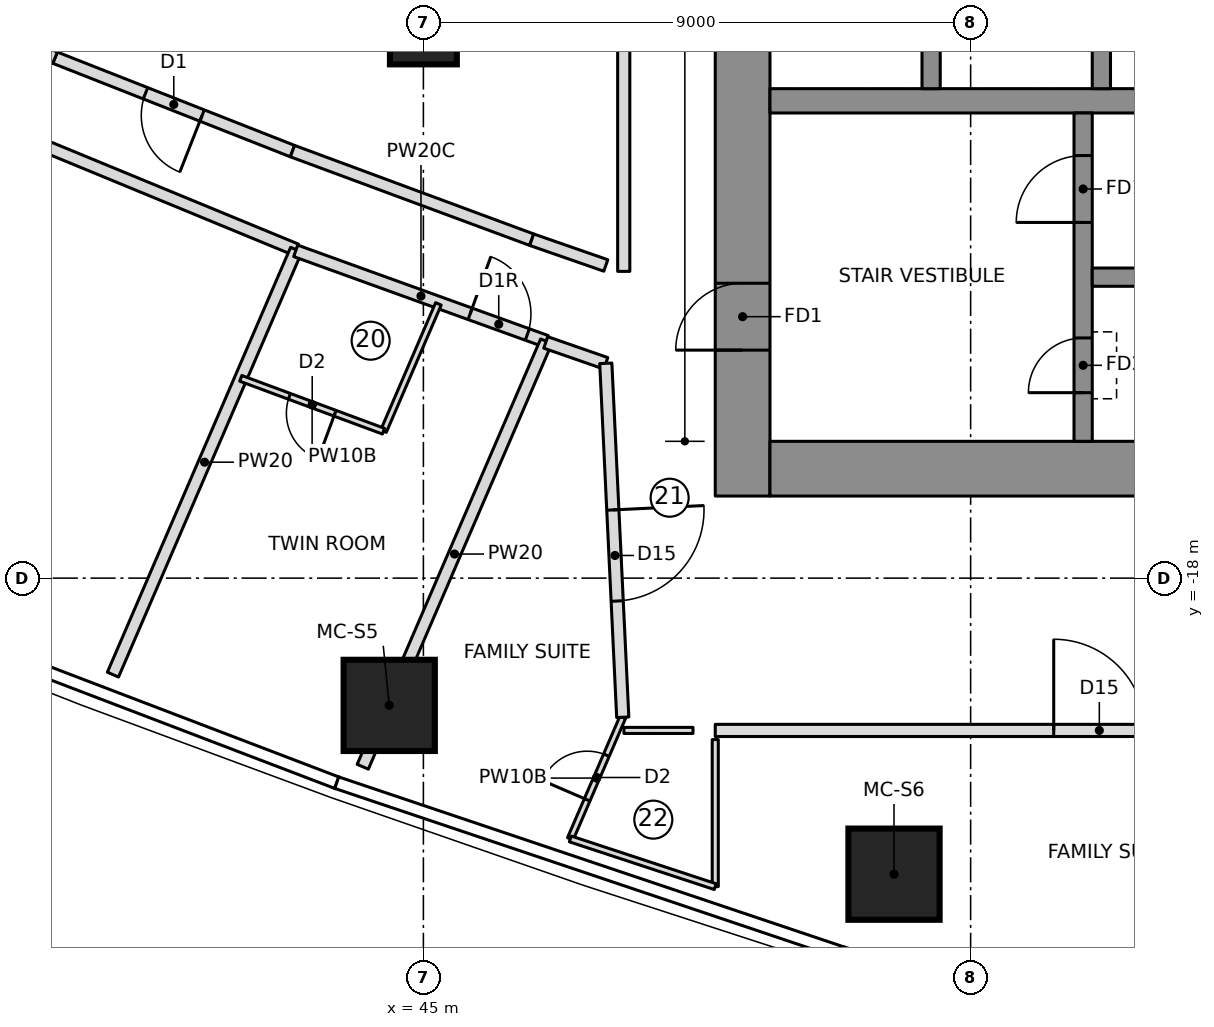
"""IFC4 building model, lengths in metres.
Left out: names, types, materials, properties, quantities, classifications, styles, units other than length and angle.
Written with IfcOpenShell. Run it as: python <this file> out.ifc"""

import sys

from ifc_helpers import new_model, si_unit, direction, frame, frame_2d, origin, origin_2d, place, context, subcontext, project, spatial, polyline, rectangle, outline, extrude, element, fill, save


model = new_model("IFC4")
c1 = context("Model", 3, precision=1e-05, world=origin(), true_north=direction((0.0, 1.0)))
c2 = subcontext(c1, "Body", "Model", "MODEL_VIEW")
j1 = project(units=[si_unit("LENGTHUNIT", "METRE"), si_unit("PLANEANGLEUNIT", "RADIAN")], contexts=[c1])
p1 = place(None, origin())
s1 = spatial("IfcSite", under=j1, at=p1, CompositionType="ELEMENT")
p2 = place(p1, origin())
s2 = spatial("IfcBuilding", under=s1, at=p2, CompositionType="ELEMENT")
p3 = place(p2, frame((0.0, 0.0, 133.75)))
s3 = spatial("IfcBuildingStorey", under=s2, at=p3, CompositionType="ELEMENT", Elevation=133.75)
p4 = place(p3, frame((50.25, -16.65, 0.0), z_axis=(0.0, 0.0, 1.0), x_axis=(0.0, 1.0, 0.0)))
e1 = element("IfcWall", 1, at=p4, inside=s3, PredefinedType="SHEAR", context=c2, shape_type="SweptSolid", body=[
    extrude(rectangle(XDim=10.0, YDim=0.9, at=frame_2d((5.0, 0.0))), origin(), (0.0, 0.0, 1.0), 3.55),
])
p5 = place(p4, frame((2.4, 0.0, 0.0)))
e2 = element("IfcOpeningElement", 2, at=p5, cuts=e1, PredefinedType="OPENING", context=c2, shape_type="SweptSolid", body=[
    extrude(rectangle(XDim=1.1, YDim=2.1, at=frame_2d((0.55, 1.05))), frame((0.0, 0.46, 0.0), z_axis=(0.0, -1.0, 0.0), x_axis=(1.0, 0.0, 0.0)), (0.0, 0.0, 1.0), 0.92),
])
p6 = place(p3, frame((50.7, -16.2, 0.0), z_axis=(0.0, 0.0, 1.0), x_axis=(1.0, 0.0, 0.0)))
e3 = element("IfcWall", 3, at=p6, inside=s3, PredefinedType="SHEAR", context=c2, shape_type="SweptSolid", body=[
    extrude(rectangle(XDim=13.92, YDim=0.9, at=frame_2d((6.96, 0.0))), origin(), (0.0, 0.0, 1.0), 3.55),
])
p7 = place(p3, frame((50.7, -10.15, 0.0), z_axis=(0.0, 0.0, 1.0), x_axis=(1.0, 0.0, 0.0)))
e4 = element("IfcWall", 4, at=p7, inside=s3, PredefinedType="SHEAR", context=c2, shape_type="SweptSolid", body=[
    extrude(rectangle(XDim=13.02, YDim=0.4, at=frame_2d((6.51, 0.0))), origin(), (0.0, 0.0, 1.0), 3.55),
])
for number, where, z_axis, x_axis in (
    (5, (53.35, -9.95, 0.0), (0.0, 0.0, 1.0), (0.0, 1.0, 0.0)),
    (6, (56.15, -9.95, 0.0), (0.0, 0.0, 1.0), (0.0, 1.0, 0.0)),
):
    element("IfcWall", number, at=place(p3, frame(where, z_axis=z_axis, x_axis=x_axis)), inside=s3, PredefinedType="SHEAR", context=c2, shape_type="SweptSolid", body=[
        extrude(rectangle(XDim=3.0, YDim=0.3, at=frame_2d((1.5, 0.0))), origin(), (0.0, 0.0, 1.0), 3.55),
    ])
p8 = place(p3, frame((55.85, -15.75, 0.0), z_axis=(0.0, 0.0, 1.0), x_axis=(0.0, 1.0, 0.0)))
e7 = element("IfcWall", 7, at=p8, inside=s3, PredefinedType="SHEAR", context=c2, shape_type="SweptSolid", body=[
    extrude(rectangle(XDim=5.4, YDim=0.3, at=frame_2d((2.7, 0.0))), origin(), (0.0, 0.0, 1.0), 3.55),
])
p9 = place(p8, frame((3.6, 0.0, 0.0)))
e8 = element("IfcOpeningElement", 8, at=p9, cuts=e7, PredefinedType="OPENING", context=c2, shape_type="SweptSolid", body=[
    extrude(rectangle(XDim=1.1, YDim=2.1, at=frame_2d((0.55, 1.05))), frame((0.0, 0.16, 0.0), z_axis=(0.0, -1.0, 0.0), x_axis=(1.0, 0.0, 0.0)), (0.0, 0.0, 1.0), 0.32),
])
p10 = place(p8, frame((0.8, 0.0, 0.0)))
e9 = element("IfcOpeningElement", 9, at=p10, cuts=e7, PredefinedType="OPENING", context=c2, shape_type="SweptSolid", body=[
    extrude(rectangle(XDim=0.9, YDim=2.1, at=frame_2d((0.45, 1.05))), frame((0.0, 0.16, 0.0), z_axis=(0.0, -1.0, 0.0), x_axis=(1.0, 0.0, 0.0)), (0.0, 0.0, 1.0), 0.32),
])
p11 = place(p3, frame((56.0, -13.05, 0.0), z_axis=(0.0, 0.0, 1.0), x_axis=(1.0, 0.0, 0.0)))
e10 = element("IfcWall", 10, at=p11, inside=s3, PredefinedType="SHEAR", context=c2, shape_type="SweptSolid", body=[
    extrude(rectangle(XDim=7.72, YDim=0.3, at=frame_2d((3.86, 0.0))), origin(), (0.0, 0.0, 1.0), 3.55),
])
for number, where, z_axis, x_axis in (
    (11, (44.438, -20.093, 0.0), (0.0, 0.0, 1.0), (1.0, 0.0, 0.0)),
    (12, (52.74, -22.869, 0.0), (0.0, 0.0, 1.0), (1.0, 0.0, 0.0)),
):
    element("IfcColumn", number, at=place(p3, frame(where, z_axis=z_axis, x_axis=x_axis)), inside=s3, PredefinedType="COLUMN", context=c2, shape_type="SweptSolid", body=[
        extrude(rectangle(XDim=1.5, YDim=1.5, at=origin_2d()), origin(), (0.0, 0.0, 1.0), 3.55),
    ])
p12 = place(p3, frame((45.0, -9.0, 0.0), z_axis=(0.0, 0.0, 1.0), x_axis=(1.0, 0.0, 0.0)))
e13 = element("IfcColumn", 13, at=p12, inside=s3, PredefinedType="COLUMN", context=c2, shape_type="SweptSolid", body=[
    extrude(rectangle(XDim=1.1, YDim=1.1, at=origin_2d()), origin(), (0.0, 0.0, 1.0), 3.55),
])
p13 = place(p3, frame((51.859, -24.257, 0.0), z_axis=(0.0, 0.0, 1.0), x_axis=(0.956964488344, -0.290205044837, 0.0)))
e14 = element("IfcWall", 14, at=p13, inside=s3, PredefinedType="NOTDEFINED", context=c2, shape_type="SweptSolid", body=[
    extrude(outline(polyline([(0.0, -0.2), (4.418, -0.2), (4.357, 0.2), (0.0, 0.2), (0.0, -0.2)])), origin(), (0.0, 0.0, 1.0), 3.25),
])
p14 = place(p13, frame((0.294, 0.0, 0.9)))
e15 = element("IfcOpeningElement", 15, at=p14, cuts=e14, PredefinedType="OPENING", context=c2, shape_type="SweptSolid", body=[
    extrude(rectangle(XDim=3.8, YDim=1.8, at=frame_2d((1.9, 0.9))), frame((0.0, 0.21, 0.0), z_axis=(0.0, -1.0, 0.0), x_axis=(1.0, 0.0, 0.0)), (0.0, 0.0, 1.0), 0.42),
])
p15 = place(p3, frame((30.772, -7.594, 0.0), z_axis=(0.0, 0.0, 1.0), x_axis=(0.924461873383, -0.381274500407, 0.0)))
e16 = element("IfcWall", 16, at=p15, inside=s3, PredefinedType="PARTITIONING", context=c2, shape_type="SweptSolid", body=[
    extrude(rectangle(XDim=13.127, YDim=0.2, at=frame_2d((6.564, 0.0))), origin(), (0.0, 0.0, 1.0), 3.25),
])
p16 = place(p15, frame((4.25, 0.0, 0.0)))
e17 = element("IfcOpeningElement", 17, at=p16, cuts=e16, PredefinedType="OPENING", context=c2, shape_type="SweptSolid", body=[
    extrude(rectangle(XDim=1.5, YDim=2.1, at=frame_2d((0.75, 1.05))), frame((0.0, 0.11, 0.0), z_axis=(0.0, -1.0, 0.0), x_axis=(1.0, 0.0, 0.0)), (0.0, 0.0, 1.0), 0.22),
])
p17 = place(p3, frame((39.895, -19.587, 0.0), z_axis=(0.0, 0.0, 1.0), x_axis=(0.395993528256, 0.918253301426, 0.0)))
e18 = element("IfcWall", 18, at=p17, inside=s3, PredefinedType="PARTITIONING", context=c2, shape_type="SweptSolid", body=[
    extrude(rectangle(XDim=7.61, YDim=0.2, at=frame_2d((3.805, 0.0))), origin(), (0.0, 0.0, 1.0), 3.25),
])
p18 = place(p3, frame((42.9, -12.617, 0.0), z_axis=(0.0, 0.0, 1.0), x_axis=(0.940555877924, -0.339638985546, 0.0)))
e19 = element("IfcWall", 19, at=p18, inside=s3, PredefinedType="PARTITIONING", context=c2, shape_type="SweptSolid", body=[
    extrude(rectangle(XDim=4.381, YDim=0.2, at=frame_2d((2.19, 0.0))), origin(), (0.0, 0.0, 1.0), 3.25),
])
p19 = place(p18, frame((3.05, 0.0, 0.0)))
e20 = element("IfcOpeningElement", 20, at=p19, cuts=e19, PredefinedType="OPENING", context=c2, shape_type="SweptSolid", body=[
    extrude(rectangle(XDim=1.0, YDim=2.1, at=frame_2d((0.5, 1.05))), frame((0.0, 0.11, 0.0), z_axis=(0.0, -1.0, 0.0), x_axis=(1.0, 0.0, 0.0)), (0.0, 0.0, 1.0), 0.22),
])
p20 = place(p3, frame((45.247, -13.49, 0.0), z_axis=(0.0, 0.0, 1.0), x_axis=(-0.395960119478, -0.918267708124, 0.0)))
e21 = element("IfcWall", 21, at=p20, inside=s3, PredefinedType="PARTITIONING", context=c2, shape_type="SweptSolid", body=[
    extrude(rectangle(XDim=2.28, YDim=0.1, at=frame_2d((1.14, 0.0))), origin(), (0.0, 0.0, 1.0), 3.25),
])
p21 = place(p3, frame((44.344, -15.583, 0.0), z_axis=(0.0, 0.0, 1.0), x_axis=(-0.937752290113, 0.347304826323, 0.0)))
e22 = element("IfcWall", 22, at=p21, inside=s3, PredefinedType="PARTITIONING", context=c2, shape_type="SweptSolid", body=[
    extrude(rectangle(XDim=2.503, YDim=0.1, at=frame_2d((1.251, 0.0))), origin(), (0.0, 0.0, 1.0), 3.25),
])
p22 = place(p21, frame((0.85, 0.0, 0.0)))
e23 = element("IfcOpeningElement", 23, at=p22, cuts=e22, PredefinedType="OPENING", context=c2, shape_type="SweptSolid", body=[
    extrude(rectangle(XDim=0.8, YDim=2.1, at=frame_2d((0.4, 1.05))), frame((0.0, 0.06, 0.0), z_axis=(0.0, -1.0, 0.0), x_axis=(1.0, 0.0, 0.0)), (0.0, 0.0, 1.0), 0.12),
])
p23 = place(p3, frame((44.003, -21.102, 0.0), z_axis=(0.0, 0.0, 1.0), x_axis=(0.39600636385, 0.918247766014, 0.0)))
e24 = element("IfcWall", 24, at=p23, inside=s3, PredefinedType="PARTITIONING", context=c2, shape_type="SweptSolid", body=[
    extrude(rectangle(XDim=7.62, YDim=0.2, at=frame_2d((3.81, 0.0))), origin(), (0.0, 0.0, 1.0), 3.25),
])
p24 = place(p3, frame((47.416, -22.289, 0.0), z_axis=(0.0, 0.0, 1.0), x_axis=(0.396028123143, 0.918238381729, 0.0)))
e25 = element("IfcWall", 25, at=p24, inside=s3, PredefinedType="PARTITIONING", context=c2, shape_type="SweptSolid", body=[
    extrude(rectangle(XDim=2.179, YDim=0.1, at=frame_2d((1.089, 0.0))), origin(), (0.0, 0.0, 1.0), 3.25),
])
p25 = place(p24, frame((0.7, 0.0, 0.0)))
e26 = element("IfcOpeningElement", 26, at=p25, cuts=e25, PredefinedType="OPENING", context=c2, shape_type="SweptSolid", body=[
    extrude(rectangle(XDim=0.8, YDim=2.1, at=frame_2d((0.4, 1.05))), frame((0.0, 0.06, 0.0), z_axis=(0.0, -1.0, 0.0), x_axis=(1.0, 0.0, 0.0)), (0.0, 0.0, 1.0), 0.12),
])
p26 = place(p3, frame((42.847, -10.977, 0.0), z_axis=(0.0, 0.0, 1.0), x_axis=(-0.930576677263, 0.36609704688, 0.0)))
e27 = element("IfcWall", 27, at=p26, inside=s3, PredefinedType="PARTITIONING", context=c2, shape_type="SweptSolid", body=[
    extrude(rectangle(XDim=4.195, YDim=0.2, at=frame_2d((2.098, 0.0))), origin(), (0.0, 0.0, 1.0), 3.25),
])
p27 = place(p26, frame((1.598, 0.0, 0.0)))
e28 = element("IfcOpeningElement", 28, at=p27, cuts=e27, PredefinedType="OPENING", context=c2, shape_type="SweptSolid", body=[
    extrude(rectangle(XDim=1.0, YDim=2.1, at=frame_2d((0.5, 1.05))), frame((0.0, 0.11, 0.0), z_axis=(0.0, -1.0, 0.0), x_axis=(1.0, 0.0, 0.0)), (0.0, 0.0, 1.0), 0.22),
])
p28 = place(p3, frame((46.781, -12.434, 0.0), z_axis=(0.0, 0.0, 1.0), x_axis=(-0.937732614305, 0.347357948044, 0.0)))
e29 = element("IfcWall", 29, at=p28, inside=s3, PredefinedType="PARTITIONING", context=c2, shape_type="SweptSolid", body=[
    extrude(rectangle(XDim=4.195, YDim=0.2, at=frame_2d((2.098, 0.0))), origin(), (0.0, 0.0, 1.0), 3.25),
])
p29 = place(p3, frame((38.943, -9.441, 0.0), z_axis=(0.0, 0.0, 1.0), x_axis=(-0.923008963065, 0.384778448073, 0.0)))
e30 = element("IfcWall", 30, at=p29, inside=s3, PredefinedType="PARTITIONING", context=c2, shape_type="SweptSolid", body=[
    extrude(rectangle(XDim=2.339, YDim=0.2, at=frame_2d((1.169, 0.0))), origin(), (0.0, 0.0, 1.0), 3.25),
])
p30 = place(p3, frame((49.8, -20.505, 0.0), z_axis=(0.0, 0.0, 1.0), x_axis=(1.0, 0.0, 0.0)))
e31 = element("IfcWall", 31, at=p30, inside=s3, PredefinedType="PARTITIONING", context=c2, shape_type="SweptSolid", body=[
    extrude(rectangle(XDim=12.133, YDim=0.2, at=frame_2d((6.066, 0.0))), origin(), (0.0, 0.0, 1.0), 3.25),
])
p31 = place(p30, frame((5.566, 0.0, 0.0)))
e32 = element("IfcOpeningElement", 32, at=p31, cuts=e31, PredefinedType="OPENING", context=c2, shape_type="SweptSolid", body=[
    extrude(rectangle(XDim=1.5, YDim=2.1, at=frame_2d((0.75, 1.05))), frame((0.0, 0.11, 0.0), z_axis=(0.0, -1.0, 0.0), x_axis=(1.0, 0.0, 0.0)), (0.0, 0.0, 1.0), 0.22),
])
p32 = place(p3, frame((48.299, -20.505, 0.0), z_axis=(0.0, 0.0, 1.0), x_axis=(1.0, 0.0, 0.0)))
e33 = element("IfcWall", 33, at=p32, inside=s3, PredefinedType="PARTITIONING", context=c2, shape_type="SweptSolid", body=[
    extrude(rectangle(XDim=1.135, YDim=0.1, at=frame_2d((0.568, 0.0))), origin(), (0.0, 0.0, 1.0), 3.25),
])
p33 = place(p3, frame((49.8, -20.656, 0.0), z_axis=(0.0, 0.0, 1.0), x_axis=(0.0, -1.0, 0.0)))
e34 = element("IfcWall", 34, at=p33, inside=s3, PredefinedType="PARTITIONING", context=c2, shape_type="SweptSolid", body=[
    extrude(rectangle(XDim=2.418, YDim=0.1, at=frame_2d((1.209, 0.0))), origin(), (0.0, 0.0, 1.0), 3.25),
])
p34 = place(p3, frame((49.8, -23.074, 0.0), z_axis=(0.0, 0.0, 1.0), x_axis=(-0.949844078437, 0.312723882455, 0.0)))
e35 = element("IfcWall", 35, at=p34, inside=s3, PredefinedType="PARTITIONING", context=c2, shape_type="SweptSolid", body=[
    extrude(rectangle(XDim=2.51, YDim=0.1, at=frame_2d((1.255, 0.0))), origin(), (0.0, 0.0, 1.0), 3.25),
])
p35 = place(p3, frame((47.012, -14.124, 0.0), z_axis=(0.0, 0.0, 1.0), x_axis=(0.944566081842, -0.32832136244, 0.0)))
e36 = element("IfcWall", 36, at=p35, inside=s3, PredefinedType="PARTITIONING", context=c2, shape_type="SweptSolid", body=[
    extrude(rectangle(XDim=1.045, YDim=0.2, at=frame_2d((0.523, 0.0))), origin(), (0.0, 0.0, 1.0), 3.25),
])
p36 = place(p3, frame((48.0, -12.858, 0.0), z_axis=(0.0, 0.0, 1.0), x_axis=(-0.944517215109, 0.328461916152, 0.0)))
e37 = element("IfcWall", 37, at=p36, inside=s3, PredefinedType="PARTITIONING", context=c2, shape_type="SweptSolid", body=[
    extrude(rectangle(XDim=1.29, YDim=0.2, at=frame_2d((0.645, 0.0))), origin(), (0.0, 0.0, 1.0), 3.25),
])
p37 = place(p3, frame((48.0, -14.467, 0.0), z_axis=(0.0, 0.0, 1.0), x_axis=(0.047837808481, -0.998855116661, 0.0)))
e38 = element("IfcWall", 38, at=p37, inside=s3, PredefinedType="PARTITIONING", context=c2, shape_type="SweptSolid", body=[
    extrude(rectangle(XDim=5.828, YDim=0.2, at=frame_2d((2.914, 0.0))), origin(), (0.0, 0.0, 1.0), 3.25),
])
p38 = place(p37, frame((2.414, 0.0, 0.0)))
e39 = element("IfcOpeningElement", 39, at=p38, cuts=e38, PredefinedType="OPENING", context=c2, shape_type="SweptSolid", body=[
    extrude(rectangle(XDim=1.5, YDim=2.1, at=frame_2d((0.75, 1.05))), frame((0.0, 0.11, 0.0), z_axis=(0.0, -1.0, 0.0), x_axis=(1.0, 0.0, 0.0)), (0.0, 0.0, 1.0), 0.22),
])
p39 = place(p3, frame((48.295, 12.955, 0.0), z_axis=(0.0, 0.0, 1.0), x_axis=(0.0, -1.0, 0.0)))
e40 = element("IfcWall", 40, at=p39, inside=s3, PredefinedType="PARTITIONING", context=c2, shape_type="SweptSolid", body=[
    extrude(rectangle(XDim=25.91, YDim=0.2, at=frame_2d((12.955, 0.0))), origin(), (0.0, 0.0, 1.0), 3.25),
])
p40 = place(p22, origin())
e41 = element("IfcDoor", 41, at=p40, inside=s3, OperationType="SINGLE_SWING_LEFT", PredefinedType="DOOR", context=c2, shape_type="SweptSolid", body=[
    extrude(rectangle(XDim=0.8, YDim=2.1, at=frame_2d((0.4, 1.05))), frame((0.0, 0.025, 0.0), z_axis=(0.0, -1.0, 0.0), x_axis=(1.0, 0.0, 0.0)), (0.0, 0.0, 1.0), 0.05),
])
fill(e23, e41)
p41 = place(p19, origin())
e42 = element("IfcDoor", 42, at=p41, inside=s3, OperationType="SINGLE_SWING_RIGHT", PredefinedType="DOOR", context=c2, shape_type="SweptSolid", body=[
    extrude(rectangle(XDim=1.0, YDim=2.1, at=frame_2d((0.5, 1.05))), frame((0.0, 0.025, 0.0), z_axis=(0.0, -1.0, 0.0), x_axis=(1.0, 0.0, 0.0)), (0.0, 0.0, 1.0), 0.05),
])
fill(e20, e42)
p42 = place(p25, origin())
e43 = element("IfcDoor", 43, at=p42, inside=s3, OperationType="SINGLE_SWING_LEFT", PredefinedType="DOOR", context=c2, shape_type="SweptSolid", body=[
    extrude(rectangle(XDim=0.8, YDim=2.1, at=frame_2d((0.4, 1.05))), frame((0.0, 0.025, 0.0), z_axis=(0.0, -1.0, 0.0), x_axis=(1.0, 0.0, 0.0)), (0.0, 0.0, 1.0), 0.05),
])
fill(e26, e43)
p43 = place(p27, origin())
e44 = element("IfcDoor", 44, at=p43, inside=s3, OperationType="SINGLE_SWING_LEFT", PredefinedType="DOOR", context=c2, shape_type="SweptSolid", body=[
    extrude(rectangle(XDim=1.0, YDim=2.1, at=frame_2d((0.5, 1.05))), frame((0.0, 0.025, 0.0), z_axis=(0.0, -1.0, 0.0), x_axis=(1.0, 0.0, 0.0)), (0.0, 0.0, 1.0), 0.05),
])
fill(e28, e44)
p44 = place(p31, origin())
e45 = element("IfcDoor", 45, at=p44, inside=s3, OperationType="DOUBLE_DOOR_SINGLE_SWING", PredefinedType="DOOR", context=c2, shape_type="SweptSolid", body=[
    extrude(rectangle(XDim=1.5, YDim=2.1, at=frame_2d((0.75, 1.05))), frame((0.0, 0.025, 0.0), z_axis=(0.0, -1.0, 0.0), x_axis=(1.0, 0.0, 0.0)), (0.0, 0.0, 1.0), 0.05),
])
fill(e32, e45)
p45 = place(p38, origin())
e46 = element("IfcDoor", 46, at=p45, inside=s3, OperationType="DOUBLE_DOOR_SINGLE_SWING", PredefinedType="DOOR", context=c2, shape_type="SweptSolid", body=[
    extrude(rectangle(XDim=1.5, YDim=2.1, at=frame_2d((0.75, 1.05))), frame((0.0, 0.025, 0.0), z_axis=(0.0, -1.0, 0.0), x_axis=(1.0, 0.0, 0.0)), (0.0, 0.0, 1.0), 0.05),
])
fill(e39, e46)
p46 = place(p9, origin())
e47 = element("IfcDoor", 47, at=p46, inside=s3, OperationType="SINGLE_SWING_RIGHT", PredefinedType="DOOR", context=c2, shape_type="SweptSolid", body=[
    extrude(rectangle(XDim=1.1, YDim=2.1, at=frame_2d((0.55, 1.05))), frame((0.0, 0.025, 0.0), z_axis=(0.0, -1.0, 0.0), x_axis=(1.0, 0.0, 0.0)), (0.0, 0.0, 1.0), 0.05),
])
fill(e8, e47)
p47 = place(p5, origin())
e48 = element("IfcDoor", 48, at=p47, inside=s3, OperationType="SINGLE_SWING_RIGHT", PredefinedType="DOOR", context=c2, shape_type="SweptSolid", body=[
    extrude(rectangle(XDim=1.1, YDim=2.1, at=frame_2d((0.55, 1.05))), frame((0.0, 0.025, 0.0), z_axis=(0.0, -1.0, 0.0), x_axis=(1.0, 0.0, 0.0)), (0.0, 0.0, 1.0), 0.05),
])
fill(e2, e48)
p48 = place(p10, origin())
e49 = element("IfcDoor", 49, at=p48, inside=s3, OperationType="SINGLE_SWING_LEFT", PredefinedType="DOOR", context=c2, shape_type="SweptSolid", body=[
    extrude(rectangle(XDim=0.9, YDim=2.1, at=frame_2d((0.45, 1.05))), frame((0.0, 0.025, 0.0), z_axis=(0.0, -1.0, 0.0), x_axis=(1.0, 0.0, 0.0)), (0.0, 0.0, 1.0), 0.05),
])
fill(e9, e49)
save(model, sys.argv[1])
